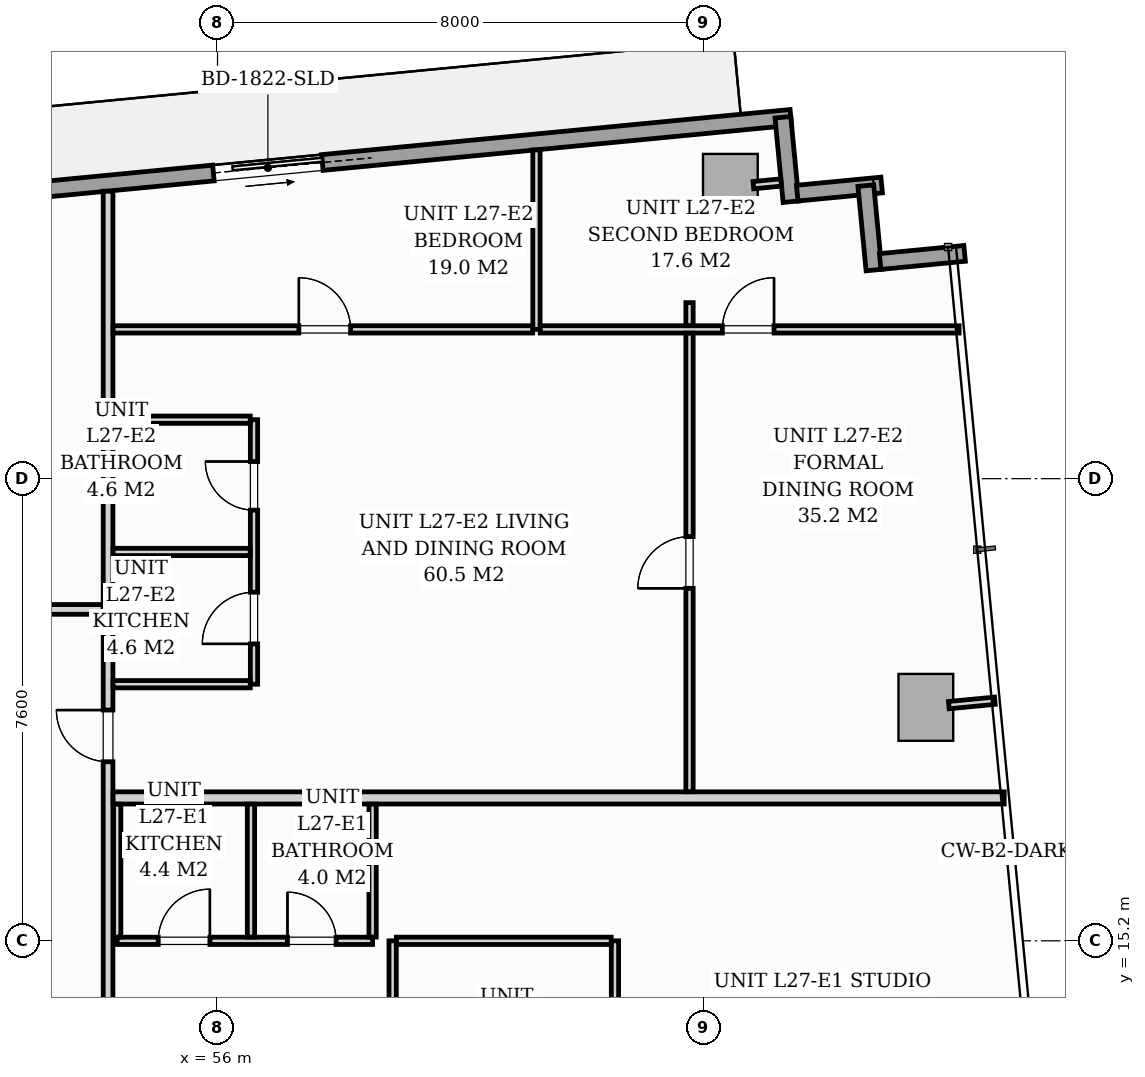
"""IFC4 building model, lengths in metres.
Left out: names, types, materials, properties, quantities, classifications, styles, units other than length and angle.
Written with IfcOpenShell. Run it as: python <this file> out.ifc"""

import sys

from ifc_helpers import new_model, si_unit, direction, frame, frame_2d, origin, origin_2d, place, context, subcontext, project, spatial, rectangle, extrude, source, transform, mapped, element, fill, save


model = new_model("IFC4")
c1 = context("Model", 3, precision=1e-05, world=origin(), true_north=direction((0.0, 1.0)))
c2 = subcontext(c1, "Body", "Model", "MODEL_VIEW")
j1 = project(units=[si_unit("LENGTHUNIT", "METRE"), si_unit("PLANEANGLEUNIT", "RADIAN")], contexts=[c1])
p1 = place(None, origin())
s1 = spatial("IfcSite", under=j1, at=p1, CompositionType="ELEMENT")
p2 = place(p1, origin())
s2 = spatial("IfcBuilding", under=s1, at=p2, CompositionType="ELEMENT")
p3 = place(p2, frame((0.0, 0.0, 97.0)))
s3 = spatial("IfcBuildingStorey", under=s2, at=p3, CompositionType="ELEMENT", Elevation=97.0)
m1 = source(origin(), c2, "Body", "SweptSolid", [
    extrude(rectangle(XDim=0.9, YDim=1.1, at=origin_2d()), origin(), (0.0, 0.0, 1.0), 3.196),
])
for number, where, z_axis, x_axis in (
    (1, (64.434, 27.591, 0.002), (0.0, 0.0, 1.0), (0.995, 0.096, 0.0)),
    (2, (67.648, 19.039, 0.002), (0.0, 0.0, 1.0), (0.995, 0.096, 0.0)),
):
    element("IfcColumn", number, at=place(p3, frame(where, z_axis=z_axis, x_axis=x_axis)), inside=s3, PredefinedType="COLUMN", context=c2, shape_type="MappedRepresentation", body=[
        mapped(m1, transform((0.0, 0.0, 0.0), scale=1.0)),
    ])
p4 = place(p3, frame((46.406, 26.91, 0.0), z_axis=(0.0, 0.0, 1.0), x_axis=(0.995396638587, 0.095841180552, 0.0)))
e3 = element("IfcWall", 3, at=p4, inside=s3, PredefinedType="STANDARD", context=c2, shape_type="SweptSolid", body=[
    extrude(rectangle(XDim=19.11, YDim=0.26, at=frame_2d((9.555, 0.0))), origin(), (0.0, 0.0, 1.0), 2.94),
])
p5 = place(p4, frame((9.57, 0.0, 0.0)))
e4 = element("IfcOpeningElement", 4, at=p5, cuts=e3, PredefinedType="OPENING", context=c2, shape_type="SweptSolid", body=[
    extrude(rectangle(XDim=1.8, YDim=2.06, at=frame_2d((0.9, 1.03))), frame((0.0, 0.14, 0.0), z_axis=(0.0, -1.0, 0.0), x_axis=(1.0, 0.0, 0.0)), (0.0, 0.0, 1.0), 0.28),
])
p6 = place(p4, frame((0.7, 0.0, 0.65)))
e5 = element("IfcOpeningElement", 5, at=p6, cuts=e3, PredefinedType="OPENING", context=c2, shape_type="SweptSolid", body=[
    extrude(rectangle(XDim=1.6, YDim=1.5, at=frame_2d((0.8, 0.75))), frame((0.0, 0.14, 0.0), z_axis=(0.0, -1.0, 0.0), x_axis=(1.0, 0.0, 0.0)), (0.0, 0.0, 1.0), 0.28),
])
for number, where, z_axis, x_axis in (
    (6, (65.298, 28.744, 0.0), (0.0, 0.0, 1.0), (0.096, -0.995, 0.0)),
    (7, (65.533, 27.496, 0.0), (0.0, 0.0, 1.0), (0.995, 0.096, 0.0)),
):
    element("IfcWall", number, at=place(p3, frame(where, z_axis=z_axis, x_axis=x_axis)), inside=s3, PredefinedType="STANDARD", context=c2, shape_type="SweptSolid", body=[
        extrude(rectangle(XDim=1.395, YDim=0.26, at=frame_2d((0.698, 0.0))), origin(), (0.0, 0.0, 1.0), 2.94),
    ])
p7 = place(p3, frame((66.662, 27.619, 0.0), z_axis=(0.0, 0.0, 1.0), x_axis=(0.095742423056, -0.99540614245, 0.0)))
e8 = element("IfcWall", 8, at=p7, inside=s3, PredefinedType="STANDARD", context=c2, shape_type="SweptSolid", body=[
    extrude(rectangle(XDim=1.395, YDim=0.26, at=frame_2d((0.697, 0.0))), origin(), (0.0, 0.0, 1.0), 2.94),
])
p8 = place(p3, frame((66.897, 26.371, 0.0), z_axis=(0.0, 0.0, 1.0), x_axis=(0.995391056452, 0.09589913835, 0.0)))
e9 = element("IfcWall", 9, at=p8, inside=s3, PredefinedType="STANDARD", context=c2, shape_type="SweptSolid", body=[
    extrude(rectangle(XDim=1.395, YDim=0.26, at=frame_2d((0.698, 0.0))), origin(), (0.0, 0.0, 1.0), 2.94),
])
p9 = place(p3, frame((54.2, 12.712, 0.0), z_axis=(0.0, 0.0, 1.0), x_axis=(0.0, 1.0, 0.0)))
e10 = element("IfcWall", 10, at=p9, inside=s3, PredefinedType="PARTITIONING", context=c2, shape_type="SweptSolid", body=[
    extrude(rectangle(XDim=14.815, YDim=0.16, at=frame_2d((7.408, 0.0))), origin(), (0.0, 0.0, 1.0), 2.94),
])
p10 = place(p9, frame((0.493, 0.0, 0.0)))
e11 = element("IfcOpeningElement", 11, at=p10, cuts=e10, PredefinedType="OPENING", context=c2, shape_type="SweptSolid", body=[
    extrude(rectangle(XDim=0.95, YDim=2.06, at=frame_2d((0.475, 1.03))), frame((0.0, 0.09, 0.0), z_axis=(0.0, -1.0, 0.0), x_axis=(1.0, 0.0, 0.0)), (0.0, 0.0, 1.0), 0.18),
])
p11 = place(p9, frame((5.433, 0.0, 0.0)))
e12 = element("IfcOpeningElement", 12, at=p11, cuts=e10, PredefinedType="OPENING", context=c2, shape_type="SweptSolid", body=[
    extrude(rectangle(XDim=0.85, YDim=2.0, at=frame_2d((0.425, 1.0))), frame((0.0, 0.09, 0.0), z_axis=(0.0, -1.0, 0.0), x_axis=(1.0, 0.0, 0.0)), (0.0, 0.0, 1.0), 0.18),
])
p12 = place(p3, frame((54.282, 17.55, 0.0), z_axis=(0.0, 0.0, 1.0), x_axis=(1.0, 0.0, 0.0)))
e13 = element("IfcWall", 13, at=p12, inside=s3, PredefinedType="PARTITIONING", context=c2, shape_type="SweptSolid", body=[
    extrude(rectangle(XDim=14.655, YDim=0.2, at=frame_2d((7.328, 0.0))), origin(), (0.0, 0.0, 1.0), 2.94),
])
p13 = place(p3, frame((54.35, 15.2, 0.0), z_axis=(0.0, 0.0, 1.0), x_axis=(1.0, 0.0, 0.0)))
e14 = element("IfcWall", 14, at=p13, inside=s3, PredefinedType="PARTITIONING", context=c2, shape_type="SweptSolid", body=[
    extrude(rectangle(XDim=4.2, YDim=0.12, at=frame_2d((2.1, 0.0))), origin(), (0.0, 0.0, 1.0), 2.94),
])
p14 = place(p13, frame((0.675, 0.0, 0.0)))
e15 = element("IfcOpeningElement", 15, at=p14, cuts=e14, PredefinedType="OPENING", context=c2, shape_type="SweptSolid", body=[
    extrude(rectangle(XDim=0.85, YDim=2.05, at=frame_2d((0.425, 1.025))), frame((0.0, 0.07, 0.0), z_axis=(0.0, -1.0, 0.0), x_axis=(1.0, 0.0, 0.0)), (0.0, 0.0, 1.0), 0.14),
])
p15 = place(p13, frame((2.8, 0.0, 0.0)))
e16 = element("IfcOpeningElement", 16, at=p15, cuts=e14, PredefinedType="OPENING", context=c2, shape_type="SweptSolid", body=[
    extrude(rectangle(XDim=0.8, YDim=2.02, at=frame_2d((0.4, 1.01))), frame((0.0, 0.07, 0.0), z_axis=(0.0, -1.0, 0.0), x_axis=(1.0, 0.0, 0.0)), (0.0, 0.0, 1.0), 0.14),
])
for number, where, z_axis, x_axis in (
    (17, (54.35, 15.262, 0.0), (0.0, 0.0, 1.0), (0.0, 1.0, 0.0)),
    (18, (56.55, 15.262, 0.0), (0.0, 0.0, 1.0), (0.0, 1.0, 0.0)),
    (19, (58.55, 15.262, 0.0), (0.0, 0.0, 1.0), (0.0, 1.0, 0.0)),
):
    element("IfcWall", number, at=place(p3, frame(where, z_axis=z_axis, x_axis=x_axis)), inside=s3, PredefinedType="PARTITIONING", context=c2, shape_type="SweptSolid", body=[
        extrude(rectangle(XDim=2.186, YDim=0.12, at=frame_2d((1.093, 0.0))), origin(), (0.0, 0.0, 1.0), 2.94),
    ])
p16 = place(p3, frame((58.88, 8.412, 0.0), z_axis=(0.0, 0.0, 1.0), x_axis=(0.0, 1.0, 0.0)))
e20 = element("IfcWall", 20, at=p16, inside=s3, PredefinedType="PARTITIONING", context=c2, shape_type="SweptSolid", body=[
    extrude(rectangle(XDim=6.788, YDim=0.12, at=frame_2d((3.394, 0.0))), origin(), (0.0, 0.0, 1.0), 2.94),
])
p17 = place(p16, frame((2.696, 0.0, 0.0)))
e21 = element("IfcOpeningElement", 21, at=p17, cuts=e20, PredefinedType="OPENING", context=c2, shape_type="SweptSolid", body=[
    extrude(rectangle(XDim=0.85, YDim=2.05, at=frame_2d((0.425, 1.025))), frame((0.0, 0.07, 0.0), z_axis=(0.0, -1.0, 0.0), x_axis=(1.0, 0.0, 0.0)), (0.0, 0.0, 1.0), 0.14),
])
p18 = place(p3, frame((62.536, 8.764, 0.0), z_axis=(0.0, 0.0, 1.0), x_axis=(0.0, 1.0, 0.0)))
e22 = element("IfcWall", 22, at=p18, inside=s3, PredefinedType="PARTITIONING", context=c2, shape_type="SweptSolid", body=[
    extrude(rectangle(XDim=6.436, YDim=0.12, at=frame_2d((3.218, 0.0))), origin(), (0.0, 0.0, 1.0), 2.94),
])
p19 = place(p18, frame((2.568, 0.0, 0.0)))
e23 = element("IfcOpeningElement", 23, at=p19, cuts=e22, PredefinedType="OPENING", context=c2, shape_type="SweptSolid", body=[
    extrude(rectangle(XDim=0.85, YDim=2.05, at=frame_2d((0.425, 1.025))), frame((0.0, 0.07, 0.0), z_axis=(0.0, -1.0, 0.0), x_axis=(1.0, 0.0, 0.0)), (0.0, 0.0, 1.0), 0.14),
])
p20 = place(p3, frame((58.942, 15.2, 0.0), z_axis=(0.0, 0.0, 1.0), x_axis=(1.0, 0.0, 0.0)))
e24 = element("IfcWall", 24, at=p20, inside=s3, PredefinedType="PARTITIONING", context=c2, shape_type="SweptSolid", body=[
    extrude(rectangle(XDim=3.532, YDim=0.12, at=frame_2d((1.766, 0.0))), origin(), (0.0, 0.0, 1.0), 2.94),
])
p21 = place(p3, frame((56.6, 19.42, 0.0), z_axis=(0.0, 0.0, 1.0), x_axis=(0.0, 1.0, 0.0)))
e25 = element("IfcWall", 25, at=p21, inside=s3, PredefinedType="PARTITIONING", context=c2, shape_type="SweptSolid", body=[
    extrude(rectangle(XDim=4.35, YDim=0.12, at=frame_2d((2.175, 0.0))), origin(), (0.0, 0.0, 1.0), 2.94),
])
p22 = place(p21, frame((0.663, 0.0, 0.0)))
e26 = element("IfcOpeningElement", 26, at=p22, cuts=e25, PredefinedType="OPENING", context=c2, shape_type="SweptSolid", body=[
    extrude(rectangle(XDim=0.85, YDim=2.05, at=frame_2d((0.425, 1.025))), frame((0.0, 0.07, 0.0), z_axis=(0.0, -1.0, 0.0), x_axis=(1.0, 0.0, 0.0)), (0.0, 0.0, 1.0), 0.14),
])
p23 = place(p21, frame((2.862, 0.0, 0.0)))
e27 = element("IfcOpeningElement", 27, at=p23, cuts=e25, PredefinedType="OPENING", context=c2, shape_type="SweptSolid", body=[
    extrude(rectangle(XDim=0.8, YDim=2.02, at=frame_2d((0.4, 1.01))), frame((0.0, 0.07, 0.0), z_axis=(0.0, -1.0, 0.0), x_axis=(1.0, 0.0, 0.0)), (0.0, 0.0, 1.0), 0.14),
])
for number, where, z_axis, x_axis in (
    (28, (54.282, 21.595, 0.0), (0.0, 0.0, 1.0), (1.0, 0.0, 0.0)),
    (29, (54.282, 19.42, 0.0), (0.0, 0.0, 1.0), (1.0, 0.0, 0.0)),
    (30, (54.282, 23.77, 0.0), (0.0, 0.0, 1.0), (1.0, 0.0, 0.0)),
):
    element("IfcWall", number, at=place(p3, frame(where, z_axis=z_axis, x_axis=x_axis)), inside=s3, PredefinedType="PARTITIONING", context=c2, shape_type="SweptSolid", body=[
        extrude(rectangle(XDim=2.256, YDim=0.12, at=frame_2d((1.128, 0.0))), origin(), (0.0, 0.0, 1.0), 2.94),
    ])
p24 = place(p3, frame((61.245, 25.255, 0.0), z_axis=(0.0, 0.0, 1.0), x_axis=(0.0, 1.0, 0.0)))
e31 = element("IfcWall", 31, at=p24, inside=s3, PredefinedType="PARTITIONING", context=c2, shape_type="SweptSolid", body=[
    extrude(rectangle(XDim=2.951, YDim=0.12, at=frame_2d((1.476, 0.0))), origin(), (0.0, 0.0, 1.0), 2.94),
])
p25 = place(p3, frame((54.282, 25.255, 0.0), z_axis=(0.0, 0.0, 1.0), x_axis=(1.0, 0.0, 0.0)))
e32 = element("IfcWall", 32, at=p25, inside=s3, PredefinedType="PARTITIONING", context=c2, shape_type="SweptSolid", body=[
    extrude(rectangle(XDim=6.901, YDim=0.12, at=frame_2d((3.451, 0.0))), origin(), (0.0, 0.0, 1.0), 2.94),
])
p26 = place(p25, frame((3.056, 0.0, 0.0)))
e33 = element("IfcOpeningElement", 33, at=p26, cuts=e32, PredefinedType="OPENING", context=c2, shape_type="SweptSolid", body=[
    extrude(rectangle(XDim=0.85, YDim=2.05, at=frame_2d((0.425, 1.025))), frame((0.0, 0.07, 0.0), z_axis=(0.0, -1.0, 0.0), x_axis=(1.0, 0.0, 0.0)), (0.0, 0.0, 1.0), 0.14),
])
p27 = place(p3, frame((61.307, 25.255, 0.0), z_axis=(0.0, 0.0, 1.0), x_axis=(1.0, 0.0, 0.0)))
e34 = element("IfcWall", 34, at=p27, inside=s3, PredefinedType="PARTITIONING", context=c2, shape_type="SweptSolid", body=[
    extrude(rectangle(XDim=6.888, YDim=0.12, at=frame_2d((3.444, 0.0))), origin(), (0.0, 0.0, 1.0), 2.94),
])
p28 = place(p27, frame((2.995, 0.0, 0.0)))
e35 = element("IfcOpeningElement", 35, at=p28, cuts=e34, PredefinedType="OPENING", context=c2, shape_type="SweptSolid", body=[
    extrude(rectangle(XDim=0.85, YDim=2.05, at=frame_2d((0.425, 1.025))), frame((0.0, 0.07, 0.0), z_axis=(0.0, -1.0, 0.0), x_axis=(1.0, 0.0, 0.0)), (0.0, 0.0, 1.0), 0.14),
])
p29 = place(p3, frame((63.762, 17.652, 0.0), z_axis=(0.0, 0.0, 1.0), x_axis=(0.0, 1.0, 0.0)))
e36 = element("IfcWall", 36, at=p29, inside=s3, PredefinedType="PARTITIONING", context=c2, shape_type="SweptSolid", body=[
    extrude(rectangle(XDim=7.541, YDim=0.12, at=frame_2d((3.771, 0.0))), origin(), (0.0, 0.0, 1.0), 2.94),
])
p30 = place(p29, frame((3.345, 0.0, 0.0)))
e37 = element("IfcOpeningElement", 37, at=p30, cuts=e36, PredefinedType="OPENING", context=c2, shape_type="SweptSolid", body=[
    extrude(rectangle(XDim=0.85, YDim=2.05, at=frame_2d((0.425, 1.025))), frame((0.0, 0.07, 0.0), z_axis=(0.0, -1.0, 0.0), x_axis=(1.0, 0.0, 0.0)), (0.0, 0.0, 1.0), 0.14),
])
p31 = place(p3, frame((63.762, 25.317, 0.0), z_axis=(0.0, 0.0, 1.0), x_axis=(0.0, 1.0, 0.0)))
e38 = element("IfcWall", 38, at=p31, inside=s3, PredefinedType="PARTITIONING", context=c2, shape_type="SweptSolid", body=[
    extrude(rectangle(XDim=0.378, YDim=0.12, at=frame_2d((0.189, 0.0))), origin(), (0.0, 0.0, 1.0), 2.94),
])
p32 = place(p3, frame((52.332, 20.65, 0.0), z_axis=(0.0, 0.0, 1.0), x_axis=(1.0, 0.0, 0.0)))
e39 = element("IfcWall", 39, at=p32, inside=s3, PredefinedType="PARTITIONING", context=c2, shape_type="SweptSolid", body=[
    extrude(rectangle(XDim=1.786, YDim=0.16, at=frame_2d((0.893, 0.0))), origin(), (0.0, 0.0, 1.0), 2.94),
])
p33 = place(p3, frame((64.812, 27.627, 0.0), z_axis=(0.0, 0.0, 1.0), x_axis=(0.995389482415, 0.095915474751, 0.0)))
e40 = element("IfcWall", 40, at=p33, inside=s3, PredefinedType="PARTITIONING", context=c2, shape_type="SweptSolid", body=[
    extrude(rectangle(XDim=0.458, YDim=0.12, at=frame_2d((0.229, 0.0))), origin(), (0.0, 0.0, 1.0), 2.94),
])
p34 = place(p3, frame((68.027, 19.076, 0.0), z_axis=(0.0, 0.0, 1.0), x_axis=(0.995377786728, 0.096036772582, 0.0)))
e41 = element("IfcWall", 41, at=p34, inside=s3, PredefinedType="PARTITIONING", context=c2, shape_type="SweptSolid", body=[
    extrude(rectangle(XDim=0.76, YDim=0.12, at=frame_2d((0.38, 0.0))), origin(), (0.0, 0.0, 1.0), 2.94),
])
m2 = source(origin(), c2, "Body", "SweptSolid", [
    extrude(rectangle(XDim=1.8, YDim=2.06, at=frame_2d((0.9, 1.03))), frame((0.0, 0.025, 0.0), z_axis=(0.0, -1.0, 0.0), x_axis=(1.0, 0.0, 0.0)), (0.0, 0.0, 1.0), 0.05),
])
p35 = place(p5, origin())
e42 = element("IfcDoor", 42, at=p35, inside=s3, OperationType="SLIDING_TO_RIGHT", PredefinedType="DOOR", context=c2, shape_type="MappedRepresentation", body=[
    mapped(m2, transform((0.0, 0.0, 0.0), scale=1.0)),
])
fill(e4, e42)
m3 = source(origin(), c2, "Body", "SweptSolid", [
    extrude(rectangle(XDim=0.85, YDim=2.05, at=frame_2d((0.425, 1.025))), frame((0.0, 0.025, 0.0), z_axis=(0.0, -1.0, 0.0), x_axis=(1.0, 0.0, 0.0)), (0.0, 0.0, 1.0), 0.05),
])
p36 = place(p14, origin())
e43 = element("IfcDoor", 43, at=p36, inside=s3, OperationType="SINGLE_SWING_RIGHT", PredefinedType="DOOR", context=c2, shape_type="MappedRepresentation", body=[
    mapped(m3, transform((0.0, 0.0, 0.0), scale=1.0)),
])
fill(e15, e43)
m4 = source(origin(), c2, "Body", "SweptSolid", [
    extrude(rectangle(XDim=0.8, YDim=2.02, at=frame_2d((0.4, 1.01))), frame((0.0, 0.025, 0.0), z_axis=(0.0, -1.0, 0.0), x_axis=(1.0, 0.0, 0.0)), (0.0, 0.0, 1.0), 0.05),
])
p37 = place(p15, origin())
e44 = element("IfcDoor", 44, at=p37, inside=s3, OperationType="SINGLE_SWING_LEFT", PredefinedType="DOOR", context=c2, shape_type="MappedRepresentation", body=[
    mapped(m4, transform((0.0, 0.0, 0.0), scale=1.0)),
])
fill(e16, e44)
m5 = source(origin(), c2, "Body", "SweptSolid", [
    extrude(rectangle(XDim=0.85, YDim=2.0, at=frame_2d((0.425, 1.0))), frame((0.0, 0.025, 0.0), z_axis=(0.0, -1.0, 0.0), x_axis=(1.0, 0.0, 0.0)), (0.0, 0.0, 1.0), 0.05),
])
p38 = place(p11, origin())
e45 = element("IfcDoor", 45, at=p38, inside=s3, OperationType="SINGLE_SWING_RIGHT", PredefinedType="DOOR", context=c2, shape_type="MappedRepresentation", body=[
    mapped(m5, transform((0.0, 0.0, 0.0), scale=1.0)),
])
fill(e12, e45)
p39 = place(p22, origin())
e46 = element("IfcDoor", 46, at=p39, inside=s3, OperationType="SINGLE_SWING_LEFT", PredefinedType="DOOR", context=c2, shape_type="MappedRepresentation", body=[
    mapped(m3, transform((0.0, 0.0, 0.0), scale=1.0)),
])
fill(e26, e46)
p40 = place(p23, origin())
e47 = element("IfcDoor", 47, at=p40, inside=s3, OperationType="SINGLE_SWING_RIGHT", PredefinedType="DOOR", context=c2, shape_type="MappedRepresentation", body=[
    mapped(m4, transform((0.0, 0.0, 0.0), scale=1.0)),
])
fill(e27, e47)
p41 = place(p26, origin())
e48 = element("IfcDoor", 48, at=p41, inside=s3, OperationType="SINGLE_SWING_LEFT", PredefinedType="DOOR", context=c2, shape_type="MappedRepresentation", body=[
    mapped(m3, transform((0.0, 0.0, 0.0), scale=1.0)),
])
fill(e33, e48)
p42 = place(p28, origin())
e49 = element("IfcDoor", 49, at=p42, inside=s3, OperationType="SINGLE_SWING_RIGHT", PredefinedType="DOOR", context=c2, shape_type="MappedRepresentation", body=[
    mapped(m3, transform((0.0, 0.0, 0.0), scale=1.0)),
])
fill(e35, e49)
p43 = place(p30, origin())
e50 = element("IfcDoor", 50, at=p43, inside=s3, OperationType="SINGLE_SWING_LEFT", PredefinedType="DOOR", context=c2, shape_type="MappedRepresentation", body=[
    mapped(m3, transform((0.0, 0.0, 0.0), scale=1.0)),
])
fill(e37, e50)
save(model, sys.argv[1])
